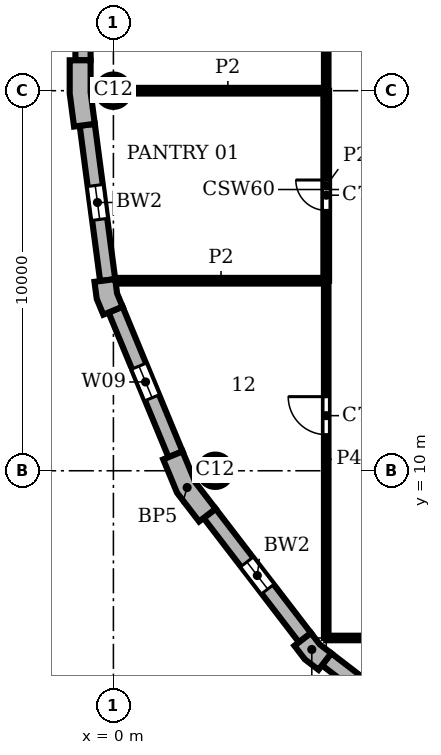
"""IFC4 building model, lengths in metres.
Left out: names, types, materials, properties, quantities, classifications, styles, units other than length and angle.
Written with IfcOpenShell. Run it as: python <this file> out.ifc"""

import sys

from ifc_helpers import new_model, si_unit, direction, frame, frame_2d, origin, origin_2d, place, context, subcontext, project, spatial, polyline, rectangle, circle, outline, extrude, element, fill, save


model = new_model("IFC4")
c1 = context("Model", 3, precision=1e-05, world=origin(), true_north=direction((0.0, 1.0)))
c2 = subcontext(c1, "Body", "Model", "MODEL_VIEW")
j1 = project(units=[si_unit("LENGTHUNIT", "METRE"), si_unit("PLANEANGLEUNIT", "RADIAN")], contexts=[c1])
p1 = place(None, origin())
s1 = spatial("IfcSite", under=j1, at=p1, CompositionType="ELEMENT")
p2 = place(p1, origin())
s2 = spatial("IfcBuilding", under=s1, at=p2, CompositionType="ELEMENT")
p3 = place(p2, frame((0.0, 0.0, 309.9)))
s3 = spatial("IfcBuildingStorey", under=s2, at=p3, CompositionType="ELEMENT", Elevation=309.9)
for number, where, z_axis, x_axis in (
    (1, (0.0, 20.0, 0.0), (0.0, 0.0, 1.0), (1.0, 0.0, 0.0)),
    (2, (2.679, 10.0, 0.0), (0.0, 0.0, 1.0), (1.0, 0.0, 0.0)),
):
    element("IfcColumn", number, at=place(p3, frame(where, z_axis=z_axis, x_axis=x_axis)), inside=s3, PredefinedType="COLUMN", context=c2, shape_type="SweptSolid", body=[
        extrude(circle(Radius=0.425, at=origin_2d()), origin(), (0.0, 0.0, 1.0), 3.9),
    ])
p4 = place(p3, origin())
e3 = element("IfcWall", 3, at=p4, inside=s3, PredefinedType="SOLIDWALL", context=c2, shape_type="SweptSolid", body=[
    extrude(outline(polyline([(-1.0, 20.8), (-1.15, 20.8), (-1.15, 19.925), (-1.036, 19.057), (-0.887, 19.076), (-0.49, 19.128), (-0.6, 19.961), (-0.6, 20.8), (-1.0, 20.8)])), origin(), (0.0, 0.0, 1.0), 3.9),
])
e4 = element("IfcWall", 4, at=p4, inside=s3, PredefinedType="SOLIDWALL", context=c2, shape_type="SweptSolid", body=[
    extrude(outline(polyline([(-0.349, 14.99), (-0.498, 14.971), (-0.439, 14.523), (-0.266, 14.106), (-0.128, 14.164), (0.242, 14.317), (0.097, 14.667), (0.047, 15.043), (-0.349, 14.99)])), origin(), (0.0, 0.0, 1.0), 3.9),
])
e5 = element("IfcWall", 5, at=p4, inside=s3, PredefinedType="SOLIDWALL", context=c2, shape_type="SweptSolid", body=[
    extrude(outline(polyline([(1.449, 10.356), (1.311, 10.299), (1.675, 9.42), (2.254, 8.665), (2.373, 8.757), (2.69, 9.0), (2.155, 9.698), (1.819, 10.51), (1.449, 10.356)])), origin(), (0.0, 0.0, 1.0), 3.9),
])
e6 = element("IfcWall", 6, at=p4, inside=s3, PredefinedType="SOLIDWALL", context=c2, shape_type="SweptSolid", body=[
    extrude(outline(polyline([(4.882, 5.487), (4.763, 5.396), (5.038, 5.038), (5.396, 4.763), (5.487, 4.882), (5.731, 5.199), (5.43, 5.43), (5.199, 5.731), (4.882, 5.487)])), origin(), (0.0, 0.0, 1.0), 3.9),
])
p5 = place(p3, frame((-0.8, 39.2, 0.0), z_axis=(0.0, 0.0, 1.0), x_axis=(0.0, -1.0, 0.0)))
e7 = element("IfcWall", 7, at=p5, inside=s3, PredefinedType="SOLIDWALL", context=c2, shape_type="SweptSolid", body=[
    extrude(rectangle(XDim=18.4, YDim=0.4, at=frame_2d((9.2, 0.0))), origin(), (0.0, 0.0, 1.0), 3.9),
])
p6 = place(p5, frame((3.75, 0.0, 0.9)))
e8 = element("IfcOpeningElement", 8, at=p6, cuts=e7, PredefinedType="OPENING", context=c2, shape_type="SweptSolid", body=[
    extrude(rectangle(XDim=0.9, YDim=2.35, at=frame_2d((0.45, 1.175))), frame((0.0, 0.21, 0.0), z_axis=(0.0, -1.0, 0.0), x_axis=(1.0, 0.0, 0.0)), (0.0, 0.0, 1.0), 0.42),
])
p7 = place(p5, frame((13.75, 0.0, 0.9)))
e9 = element("IfcOpeningElement", 9, at=p7, cuts=e7, PredefinedType="OPENING", context=c2, shape_type="SweptSolid", body=[
    extrude(rectangle(XDim=0.9, YDim=2.35, at=frame_2d((0.45, 1.175))), frame((0.0, 0.21, 0.0), z_axis=(0.0, -1.0, 0.0), x_axis=(1.0, 0.0, 0.0)), (0.0, 0.0, 1.0), 0.42),
])
p8 = place(p3, frame((-0.689, 19.102, 0.0), z_axis=(0.0, 0.0, 1.0), x_axis=(0.130514280502, -0.991446429508, 0.0)))
e10 = element("IfcWall", 10, at=p8, inside=s3, PredefinedType="SOLIDWALL", context=c2, shape_type="SweptSolid", body=[
    extrude(rectangle(XDim=4.121, YDim=0.4, at=frame_2d((2.061, 0.0))), origin(), (0.0, 0.0, 1.0), 3.9),
])
p9 = place(p8, frame((1.611, 0.0, 0.9)))
e11 = element("IfcOpeningElement", 11, at=p9, cuts=e10, PredefinedType="OPENING", context=c2, shape_type="SweptSolid", body=[
    extrude(rectangle(XDim=0.9, YDim=2.35, at=frame_2d((0.45, 1.175))), frame((0.0, 0.21, 0.0), z_axis=(0.0, -1.0, 0.0), x_axis=(1.0, 0.0, 0.0)), (0.0, 0.0, 1.0), 0.42),
])
p10 = place(p3, frame((0.057, 14.24, 0.0), z_axis=(0.0, 0.0, 1.0), x_axis=(0.382721546029, -0.923863744394, 0.0)))
e12 = element("IfcWall", 12, at=p10, inside=s3, PredefinedType="SOLIDWALL", context=c2, shape_type="SweptSolid", body=[
    extrude(rectangle(XDim=4.121, YDim=0.4, at=frame_2d((2.061, 0.0))), origin(), (0.0, 0.0, 1.0), 3.9),
])
p11 = place(p10, frame((1.611, 0.0, 0.9)))
e13 = element("IfcOpeningElement", 13, at=p11, cuts=e12, PredefinedType="OPENING", context=c2, shape_type="SweptSolid", body=[
    extrude(rectangle(XDim=0.9, YDim=2.35, at=frame_2d((0.45, 1.175))), frame((0.0, 0.21, 0.0), z_axis=(0.0, -1.0, 0.0), x_axis=(1.0, 0.0, 0.0)), (0.0, 0.0, 1.0), 0.42),
])
p12 = place(p3, frame((2.532, 8.878, 0.0), z_axis=(0.0, 0.0, 1.0), x_axis=(0.608759824817, -0.793354571229, 0.0)))
e14 = element("IfcWall", 14, at=p12, inside=s3, PredefinedType="SOLIDWALL", context=c2, shape_type="SweptSolid", body=[
    extrude(rectangle(XDim=4.121, YDim=0.4, at=frame_2d((2.061, 0.0))), origin(), (0.0, 0.0, 1.0), 3.9),
])
p13 = place(p12, frame((1.611, 0.0, 0.9)))
e15 = element("IfcOpeningElement", 15, at=p13, cuts=e14, PredefinedType="OPENING", context=c2, shape_type="SweptSolid", body=[
    extrude(rectangle(XDim=0.9, YDim=2.35, at=frame_2d((0.45, 1.175))), frame((0.0, 0.21, 0.0), z_axis=(0.0, -1.0, 0.0), x_axis=(1.0, 0.0, 0.0)), (0.0, 0.0, 1.0), 0.42),
])
p14 = place(p3, frame((5.609, 5.041, 0.0), z_axis=(0.0, 0.0, 1.0), x_axis=(0.793354571229, -0.608759824817, 0.0)))
e16 = element("IfcWall", 16, at=p14, inside=s3, PredefinedType="SOLIDWALL", context=c2, shape_type="SweptSolid", body=[
    extrude(rectangle(XDim=4.121, YDim=0.4, at=frame_2d((2.061, 0.0))), origin(), (0.0, 0.0, 1.0), 3.9),
])
p15 = place(p14, frame((1.611, 0.0, 0.9)))
e17 = element("IfcOpeningElement", 17, at=p15, cuts=e16, PredefinedType="OPENING", context=c2, shape_type="SweptSolid", body=[
    extrude(rectangle(XDim=0.9, YDim=2.35, at=frame_2d((0.45, 1.175))), frame((0.0, 0.21, 0.0), z_axis=(0.0, -1.0, 0.0), x_axis=(1.0, 0.0, 0.0)), (0.0, 0.0, 1.0), 0.42),
])
p16 = place(p3, frame((5.6, 15.0, 0.0), z_axis=(0.0, 0.0, 1.0), x_axis=(0.0, 1.0, 0.0)))
e18 = element("IfcWall", 18, at=p16, inside=s3, PredefinedType="PARTITIONING", context=c2, shape_type="SweptSolid", body=[
    extrude(rectangle(XDim=5.0, YDim=0.15, at=frame_2d((2.5, 0.0))), origin(), (0.0, 0.0, 1.0), 3.58),
])
p17 = place(p16, frame((1.85, 0.0, 0.0)))
e19 = element("IfcOpeningElement", 19, at=p17, cuts=e18, PredefinedType="OPENING", context=c2, shape_type="SweptSolid", body=[
    extrude(rectangle(XDim=0.8, YDim=2.1, at=frame_2d((0.4, 1.05))), frame((0.0, 0.085, 0.0), z_axis=(0.0, -1.0, 0.0), x_axis=(1.0, 0.0, 0.0)), (0.0, 0.0, 1.0), 0.17),
])
p18 = place(p3, frame((0.063, 15.0, 0.0), z_axis=(0.0, 0.0, 1.0), x_axis=(1.0, 0.0, 0.0)))
e20 = element("IfcWall", 20, at=p18, inside=s3, PredefinedType="PARTITIONING", context=c2, shape_type="SweptSolid", body=[
    extrude(rectangle(XDim=5.537, YDim=0.15, at=frame_2d((2.769, 0.0))), origin(), (0.0, 0.0, 1.0), 3.58),
])
p19 = place(p3, frame((0.425, 20.0, 0.0), z_axis=(0.0, 0.0, 1.0), x_axis=(1.0, 0.0, 0.0)))
e21 = element("IfcWall", 21, at=p19, inside=s3, PredefinedType="PARTITIONING", context=c2, shape_type="SweptSolid", body=[
    extrude(rectangle(XDim=5.175, YDim=0.15, at=frame_2d((2.587, 0.0))), origin(), (0.0, 0.0, 1.0), 3.58),
])
p20 = place(p3, frame((5.6, 5.6, 0.0), z_axis=(0.0, 0.0, 1.0), x_axis=(0.0, 1.0, 0.0)))
e22 = element("IfcWall", 22, at=p20, inside=s3, PredefinedType="PARTITIONING", context=c2, shape_type="SweptSolid", body=[
    extrude(rectangle(XDim=9.4, YDim=0.12, at=frame_2d((4.7, 0.0))), origin(), (0.0, 0.0, 1.0), 3.58),
])
p21 = place(p20, frame((5.35, 0.0, 0.0)))
e23 = element("IfcOpeningElement", 23, at=p21, cuts=e22, PredefinedType="OPENING", context=c2, shape_type="SweptSolid", body=[
    extrude(rectangle(XDim=1.0, YDim=2.1, at=frame_2d((0.5, 1.05))), frame((0.0, 0.07, 0.0), z_axis=(0.0, -1.0, 0.0), x_axis=(1.0, 0.0, 0.0)), (0.0, 0.0, 1.0), 0.14),
])
p22 = place(p3, frame((5.6, 20.0, 0.0), z_axis=(0.0, 0.0, 1.0), x_axis=(0.0, 1.0, 0.0)))
e24 = element("IfcWall", 24, at=p22, inside=s3, PredefinedType="PARTITIONING", context=c2, shape_type="SweptSolid", body=[
    extrude(rectangle(XDim=8.0, YDim=0.12, at=frame_2d((4.0, 0.0))), origin(), (0.0, 0.0, 1.0), 3.58),
])
p23 = place(p22, frame((2.35, 0.0, 0.0)))
e25 = element("IfcOpeningElement", 25, at=p23, cuts=e24, PredefinedType="OPENING", context=c2, shape_type="SweptSolid", body=[
    extrude(rectangle(XDim=1.8, YDim=2.1, at=frame_2d((0.9, 1.05))), frame((0.0, 0.07, 0.0), z_axis=(0.0, -1.0, 0.0), x_axis=(1.0, 0.0, 0.0)), (0.0, 0.0, 1.0), 0.14),
])
p24 = place(p3, frame((5.6, 5.6, 0.0), z_axis=(0.0, 0.0, 1.0), x_axis=(1.0, 0.0, 0.0)))
e26 = element("IfcWall", 26, at=p24, inside=s3, PredefinedType="PARTITIONING", context=c2, shape_type="SweptSolid", body=[
    extrude(rectangle(XDim=9.4, YDim=0.12, at=frame_2d((4.7, 0.0))), origin(), (0.0, 0.0, 1.0), 3.58),
])
p25 = place(p24, frame((4.6, 0.0, 0.0)))
e27 = element("IfcOpeningElement", 27, at=p25, cuts=e26, PredefinedType="OPENING", context=c2, shape_type="SweptSolid", body=[
    extrude(rectangle(XDim=1.0, YDim=2.1, at=frame_2d((0.5, 1.05))), frame((0.0, 0.07, 0.0), z_axis=(0.0, -1.0, 0.0), x_axis=(1.0, 0.0, 0.0)), (0.0, 0.0, 1.0), 0.14),
])
p26 = place(p9, origin())
e28 = element("IfcWindow", 28, at=p26, inside=s3, PartitioningType="SINGLE_PANEL", PredefinedType="WINDOW", context=c2, shape_type="SweptSolid", body=[
    extrude(rectangle(XDim=0.9, YDim=2.35, at=frame_2d((0.45, 1.175))), frame((0.0, 0.16, 0.0), z_axis=(0.0, -1.0, 0.0), x_axis=(1.0, 0.0, 0.0)), (0.0, 0.0, 1.0), 0.06),
])
fill(e11, e28)
p27 = place(p11, origin())
e29 = element("IfcWindow", 29, at=p27, inside=s3, PartitioningType="SINGLE_PANEL", PredefinedType="WINDOW", context=c2, shape_type="SweptSolid", body=[
    extrude(rectangle(XDim=0.9, YDim=2.35, at=frame_2d((0.45, 1.175))), frame((0.0, 0.16, 0.0), z_axis=(0.0, -1.0, 0.0), x_axis=(1.0, 0.0, 0.0)), (0.0, 0.0, 1.0), 0.06),
])
fill(e13, e29)
p28 = place(p13, origin())
e30 = element("IfcWindow", 30, at=p28, inside=s3, PartitioningType="SINGLE_PANEL", PredefinedType="WINDOW", context=c2, shape_type="SweptSolid", body=[
    extrude(rectangle(XDim=0.9, YDim=2.35, at=frame_2d((0.45, 1.175))), frame((0.0, 0.16, 0.0), z_axis=(0.0, -1.0, 0.0), x_axis=(1.0, 0.0, 0.0)), (0.0, 0.0, 1.0), 0.06),
])
fill(e15, e30)
p29 = place(p21, origin())
e31 = element("IfcDoor", 31, at=p29, inside=s3, OperationType="SINGLE_SWING_RIGHT", PredefinedType="DOOR", context=c2, shape_type="SweptSolid", body=[
    extrude(rectangle(XDim=1.0, YDim=2.1, at=frame_2d((0.5, 1.05))), frame((0.0, 0.025, 0.0), z_axis=(0.0, -1.0, 0.0), x_axis=(1.0, 0.0, 0.0)), (0.0, 0.0, 1.0), 0.05),
])
fill(e23, e31)
p30 = place(p17, origin())
e32 = element("IfcDoor", 32, at=p30, inside=s3, OperationType="SINGLE_SWING_RIGHT", PredefinedType="DOOR", context=c2, shape_type="SweptSolid", body=[
    extrude(rectangle(XDim=0.8, YDim=2.1, at=frame_2d((0.4, 1.05))), frame((0.0, 0.025, 0.0), z_axis=(0.0, -1.0, 0.0), x_axis=(1.0, 0.0, 0.0)), (0.0, 0.0, 1.0), 0.05),
])
fill(e19, e32)
save(model, sys.argv[1])
